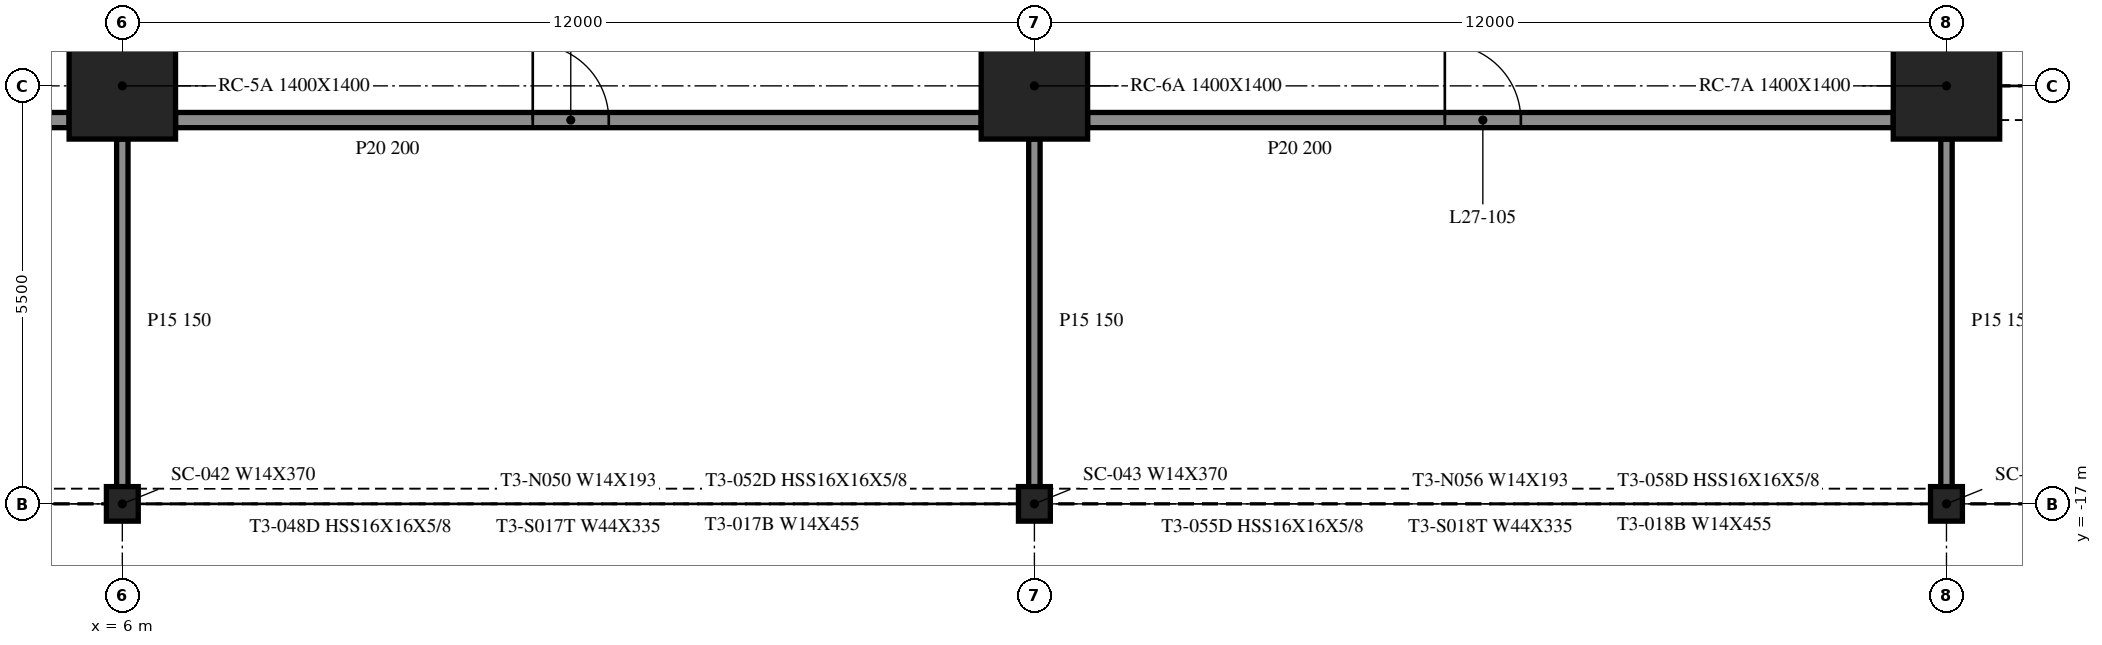
"""IFC4 building model, lengths in metres.
Left out: names, types, materials, properties, quantities, classifications, styles, units other than length and angle.
Written with IfcOpenShell. Run it as: python <this file> out.ifc"""

import sys

from ifc_helpers import new_model, si_unit, direction, frame, frame_2d, origin, origin_2d, place, context, subcontext, project, spatial, rectangle, i_section, extrude, element, fill, save


model = new_model("IFC4")
c1 = context("Model", 3, precision=1e-05, world=origin(), true_north=direction((0.0, 1.0)))
c2 = subcontext(c1, "Body", "Model", "MODEL_VIEW")
j1 = project(units=[si_unit("LENGTHUNIT", "METRE"), si_unit("PLANEANGLEUNIT", "RADIAN")], contexts=[c1])
p1 = place(None, origin())
s1 = spatial("IfcSite", under=j1, at=p1, CompositionType="ELEMENT")
p2 = place(p1, origin())
s2 = spatial("IfcBuilding", under=s1, at=p2, CompositionType="ELEMENT")
p3 = place(p2, frame((0.0, 0.0, 117.6)))
s3 = spatial("IfcBuildingStorey", under=s2, at=p3, CompositionType="ELEMENT", Elevation=117.6)
for number, where, z_axis, x_axis in (
    (1, (6.0, -11.5, -0.55), (0.0, 0.0, 1.0), (1.0, 0.0, 0.0)),
    (2, (18.0, -11.5, -0.55), (0.0, 0.0, 1.0), (1.0, 0.0, 0.0)),
    (3, (30.0, -11.5, -0.55), (0.0, 0.0, 1.0), (1.0, 0.0, 0.0)),
):
    element("IfcColumn", number, at=place(p3, frame(where, z_axis=z_axis, x_axis=x_axis)), inside=s3, PredefinedType="COLUMN", context=c2, shape_type="SweptSolid", body=[
        extrude(rectangle(XDim=1.4, YDim=1.4, at=origin_2d()), origin(), (0.0, 0.0, 1.0), 4.61),
    ])
for number, where, z_axis, x_axis in (
    (4, (6.0, -17.0, -0.55), (0.0, 0.0, 1.0), (1.0, 0.0, 0.0)),
    (5, (18.0, -17.0, -0.55), (0.0, 0.0, 1.0), (1.0, 0.0, 0.0)),
    (6, (30.0, -17.0, -0.55), (0.0, 0.0, 1.0), (1.0, 0.0, 0.0)),
):
    element("IfcColumn", number, at=place(p3, frame(where, z_axis=z_axis, x_axis=x_axis)), inside=s3, PredefinedType="COLUMN", context=c2, shape_type="SweptSolid", body=[
        extrude(i_section(OverallWidth=0.419, OverallDepth=0.455, WebThickness=0.042, FlangeThickness=0.068, at=origin_2d()), origin(), (0.0, 0.0, 1.0), 4.61),
    ])
p4 = place(p3, frame((-5.3, -11.95, 0.0), z_axis=(0.0, 0.0, 1.0), x_axis=(1.0, 0.0, 0.0)))
e7 = element("IfcWall", 7, at=p4, inside=s3, PredefinedType="PARTITIONING", context=c2, shape_type="SweptSolid", body=[
    extrude(rectangle(XDim=10.6, YDim=0.2, at=frame_2d((5.3, 0.0))), origin(), (0.0, 0.0, 1.0), 4.06),
])
p5 = place(p4, frame((4.7, 0.0, 0.0)))
e8 = element("IfcOpeningElement", 8, at=p5, cuts=e7, PredefinedType="OPENING", context=c2, shape_type="SweptSolid", body=[
    extrude(rectangle(XDim=1.2, YDim=2.1, at=frame_2d((0.6, 1.05))), frame((0.0, 0.11, 0.0), z_axis=(0.0, -1.0, 0.0), x_axis=(1.0, 0.0, 0.0)), (0.0, 0.0, 1.0), 0.22),
])
p6 = place(p3, frame((6.7, -11.95, 0.0), z_axis=(0.0, 0.0, 1.0), x_axis=(1.0, 0.0, 0.0)))
e9 = element("IfcWall", 9, at=p6, inside=s3, PredefinedType="PARTITIONING", context=c2, shape_type="SweptSolid", body=[
    extrude(rectangle(XDim=10.6, YDim=0.2, at=frame_2d((5.3, 0.0))), origin(), (0.0, 0.0, 1.0), 4.06),
])
p7 = place(p6, frame((4.7, 0.0, 0.0)))
e10 = element("IfcOpeningElement", 10, at=p7, cuts=e9, PredefinedType="OPENING", context=c2, shape_type="SweptSolid", body=[
    extrude(rectangle(XDim=1.0, YDim=2.1, at=frame_2d((0.5, 1.05))), frame((0.0, 0.11, 0.0), z_axis=(0.0, -1.0, 0.0), x_axis=(1.0, 0.0, 0.0)), (0.0, 0.0, 1.0), 0.22),
])
p8 = place(p3, frame((18.7, -11.95, 0.0), z_axis=(0.0, 0.0, 1.0), x_axis=(1.0, 0.0, 0.0)))
e11 = element("IfcWall", 11, at=p8, inside=s3, PredefinedType="PARTITIONING", context=c2, shape_type="SweptSolid", body=[
    extrude(rectangle(XDim=10.6, YDim=0.2, at=frame_2d((5.3, 0.0))), origin(), (0.0, 0.0, 1.0), 4.06),
])
p9 = place(p8, frame((4.7, 0.0, 0.0)))
e12 = element("IfcOpeningElement", 12, at=p9, cuts=e11, PredefinedType="OPENING", context=c2, shape_type="SweptSolid", body=[
    extrude(rectangle(XDim=1.0, YDim=2.1, at=frame_2d((0.5, 1.05))), frame((0.0, 0.11, 0.0), z_axis=(0.0, -1.0, 0.0), x_axis=(1.0, 0.0, 0.0)), (0.0, 0.0, 1.0), 0.22),
])
for number, where, z_axis, x_axis in (
    (13, (6.0, -17.0, 0.0), (0.0, 0.0, 1.0), (0.0, 1.0, 0.0)),
    (14, (18.0, -17.0, 0.0), (0.0, 0.0, 1.0), (0.0, 1.0, 0.0)),
    (15, (30.0, -17.0, 0.0), (0.0, 0.0, 1.0), (0.0, 1.0, 0.0)),
):
    element("IfcWall", number, at=place(p3, frame(where, z_axis=z_axis, x_axis=x_axis)), inside=s3, PredefinedType="PARTITIONING", context=c2, shape_type="SweptSolid", body=[
        extrude(rectangle(XDim=4.8, YDim=0.15, at=frame_2d((2.4, 0.0))), origin(), (0.0, 0.0, 1.0), 4.06),
    ])
p10 = place(p7, origin())
e16 = element("IfcDoor", 16, at=p10, inside=s3, OperationType="SINGLE_SWING_RIGHT", PredefinedType="DOOR", context=c2, shape_type="SweptSolid", body=[
    extrude(rectangle(XDim=1.0, YDim=2.1, at=frame_2d((0.5, 1.05))), frame((0.0, 0.025, 0.0), z_axis=(0.0, -1.0, 0.0), x_axis=(1.0, 0.0, 0.0)), (0.0, 0.0, 1.0), 0.05),
])
fill(e10, e16)
p11 = place(p9, origin())
e17 = element("IfcDoor", 17, at=p11, inside=s3, OperationType="SINGLE_SWING_RIGHT", PredefinedType="DOOR", context=c2, shape_type="SweptSolid", body=[
    extrude(rectangle(XDim=1.0, YDim=2.1, at=frame_2d((0.5, 1.05))), frame((0.0, 0.025, 0.0), z_axis=(0.0, -1.0, 0.0), x_axis=(1.0, 0.0, 0.0)), (0.0, 0.0, 1.0), 0.05),
])
fill(e12, e17)
save(model, sys.argv[1])
